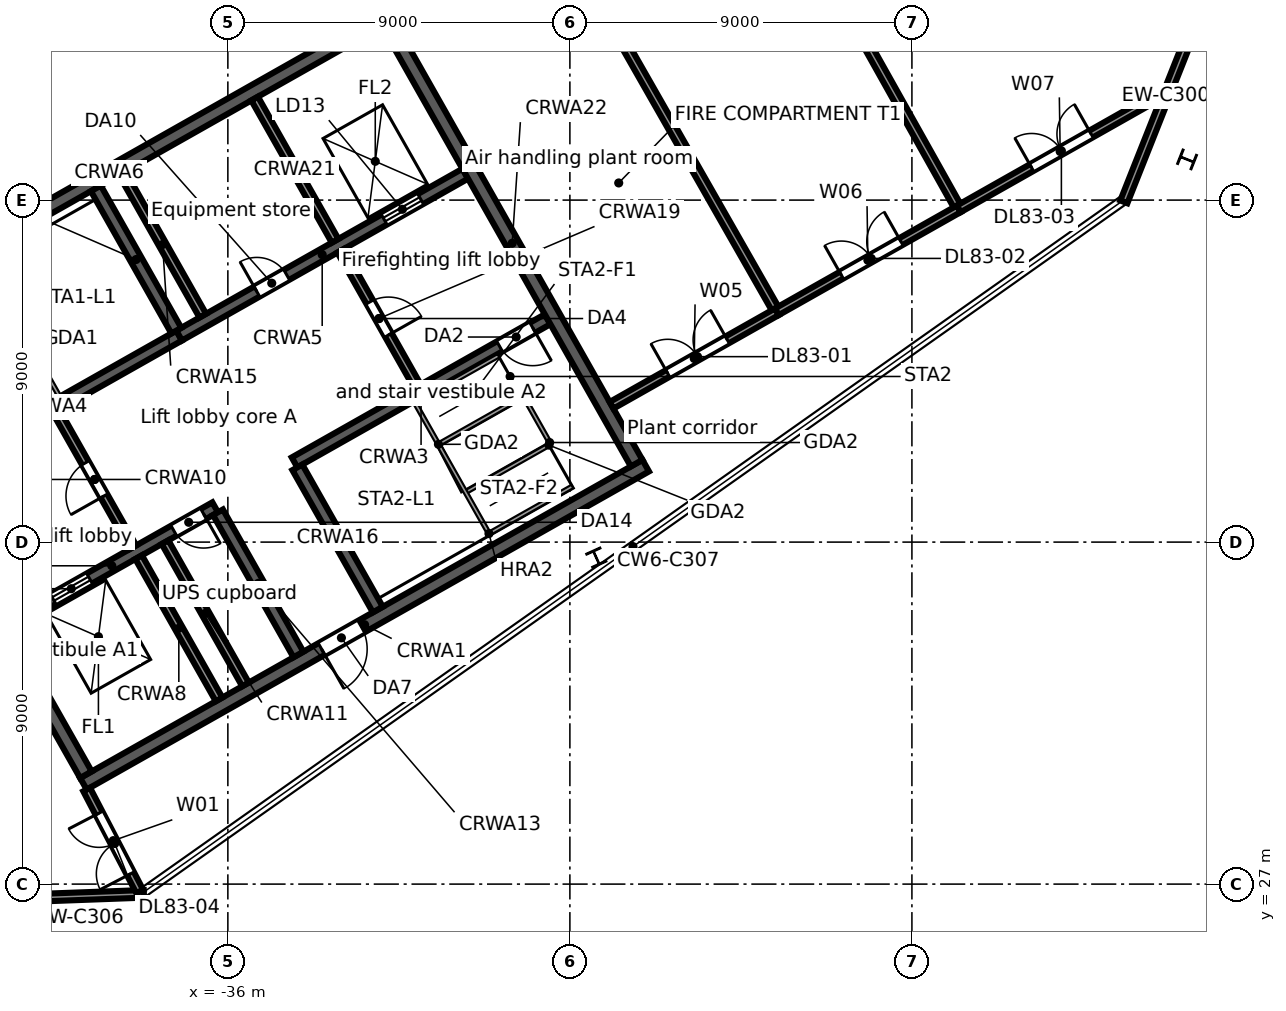
"""IFC4 building model, lengths in metres.
Left out: names, types, materials, properties, quantities, classifications, styles, units other than length and angle.
Written with IfcOpenShell. Run it as: python <this file> out.ifc"""

import sys

from ifc_helpers import new_model, si_unit, direction, frame, frame_2d, origin, origin_2d, place, context, subcontext, project, spatial, rectangle, i_section, extrude, element, fill, save


model = new_model("IFC4")
c1 = context("Model", 3, precision=1e-05, world=origin(), true_north=direction((0.0, 1.0)))
c2 = subcontext(c1, "Body", "Model", "MODEL_VIEW")
j1 = project(units=[si_unit("LENGTHUNIT", "METRE"), si_unit("PLANEANGLEUNIT", "RADIAN")], contexts=[c1])
p1 = place(None, origin())
s1 = spatial("IfcSite", under=j1, at=p1, CompositionType="ELEMENT")
p2 = place(p1, origin())
s2 = spatial("IfcBuilding", under=s1, at=p2, CompositionType="ELEMENT")
p3 = place(p2, frame((0.0, 0.0, 361.3)))
s3 = spatial("IfcBuildingStorey", under=s2, at=p3, CompositionType="ELEMENT", Elevation=361.3)
p4 = place(p3, frame((-10.76, 46.071, 0.0), z_axis=(0.0, 0.0, 1.0), x_axis=(0.369033125724, 0.929416242659, 0.0)))
e1 = element("IfcColumn", 1, at=p4, inside=s3, PredefinedType="COLUMN", context=c2, shape_type="SweptSolid", body=[
    extrude(i_section(OverallWidth=0.4, OverallDepth=0.4, WebThickness=0.013, FlangeThickness=0.021, FilletRadius=0.022, at=origin_2d()), origin(), (0.0, 0.0, 1.0), 3.6),
])
p5 = place(p3, frame((-26.305, 35.591, -0.3), z_axis=(0.0, 0.0, 1.0), x_axis=(0.910705289655, 0.413056745973, 0.0)))
e2 = element("IfcColumn", 2, at=p5, inside=s3, PredefinedType="COLUMN", context=c2, shape_type="SweptSolid", body=[
    extrude(i_section(OverallWidth=0.4, OverallDepth=0.4, WebThickness=0.013, FlangeThickness=0.021, FilletRadius=0.022, at=origin_2d()), origin(), (0.0, 0.0, 1.0), 3.9),
])
p6 = place(p3, frame((-10.22, 50.501, 0.0), z_axis=(0.0, 0.0, 1.0), x_axis=(-0.369026712049, -0.929418789241, 0.0)))
e3 = element("IfcWall", 3, at=p6, inside=s3, PredefinedType="STANDARD", context=c2, shape_type="SweptSolid", body=[
    extrude(rectangle(XDim=5.968, YDim=0.2, at=frame_2d((2.984, 0.0))), origin(), (0.0, 0.0, 1.0), 2.7),
])
p7 = place(p3, frame((-38.21, 26.744, 0.0), z_axis=(0.0, 0.0, 1.0), x_axis=(-0.999319030106, -0.036898185155, 0.0)))
e4 = element("IfcWall", 4, at=p7, inside=s3, PredefinedType="STANDARD", context=c2, shape_type="SweptSolid", body=[
    extrude(rectangle(XDim=5.968, YDim=0.2, at=frame_2d((2.984, 0.0))), origin(), (0.0, 0.0, 1.0), 3.3),
])
p8 = place(p3, frame((-39.801, 29.64, 0.0), z_axis=(0.0, 0.0, 1.0), x_axis=(0.870359753402, 0.492416388494, 0.0)))
e5 = element("IfcWall", 5, at=p8, inside=s3, PredefinedType="SOLIDWALL", context=c2, shape_type="SweptSolid", body=[
    extrude(rectangle(XDim=17.0, YDim=0.35, at=frame_2d((8.5, 0.0))), origin(), (0.0, 0.0, 1.0), 3.3),
])
p9 = place(p8, frame((7.2, 0.0, 0.0)))
e6 = element("IfcOpeningElement", 6, at=p9, cuts=e5, PredefinedType="OPENING", context=c2, shape_type="SweptSolid", body=[
    extrude(rectangle(XDim=1.2, YDim=2.1, at=frame_2d((0.6, 1.05))), frame((0.0, 0.185, 0.0), z_axis=(0.0, -1.0, 0.0), x_axis=(1.0, 0.0, 0.0)), (0.0, 0.0, 1.0), 0.37),
])
p10 = place(p3, frame((-41.774, 33.838, 0.0), z_axis=(0.0, 0.0, 1.0), x_axis=(0.870355415866, 0.492424055132, 0.0)))
e7 = element("IfcWall", 7, at=p10, inside=s3, PredefinedType="SOLIDWALL", context=c2, shape_type="SweptSolid", body=[
    extrude(rectangle(XDim=6.25, YDim=0.3, at=frame_2d((3.125, 0.0))), origin(), (0.0, 0.0, 1.0), 3.3),
])
p11 = place(p10, frame((1.35, 0.0, 0.0)))
e8 = element("IfcOpeningElement", 8, at=p11, cuts=e7, PredefinedType="OPENING", context=c2, shape_type="SweptSolid", body=[
    extrude(rectangle(XDim=1.1, YDim=2.1, at=frame_2d((0.55, 1.05))), frame((0.0, 0.16, 0.0), z_axis=(0.0, -1.0, 0.0), x_axis=(1.0, 0.0, 0.0)), (0.0, 0.0, 1.0), 0.32),
])
p12 = place(p10, frame((5.0, 0.0, 0.0)))
e9 = element("IfcOpeningElement", 9, at=p12, cuts=e7, PredefinedType="OPENING", context=c2, shape_type="SweptSolid", body=[
    extrude(rectangle(XDim=0.9, YDim=2.1, at=frame_2d((0.45, 1.05))), frame((0.0, 0.16, 0.0), z_axis=(0.0, -1.0, 0.0), x_axis=(1.0, 0.0, 0.0)), (0.0, 0.0, 1.0), 0.32),
])
p13 = place(p3, frame((-34.245, 38.097, 0.0), z_axis=(0.0, 0.0, 1.0), x_axis=(0.870352347706, 0.49242947804, 0.0)))
e10 = element("IfcWall", 10, at=p13, inside=s3, PredefinedType="SOLIDWALL", context=c2, shape_type="SweptSolid", body=[
    extrude(rectangle(XDim=7.65, YDim=0.3, at=frame_2d((3.825, 0.0))), origin(), (0.0, 0.0, 1.0), 3.3),
])
p14 = place(p13, frame((6.2, 0.0, 0.0)))
e11 = element("IfcOpeningElement", 11, at=p14, cuts=e10, PredefinedType="OPENING", context=c2, shape_type="SweptSolid", body=[
    extrude(rectangle(XDim=1.0, YDim=2.1, at=frame_2d((0.5, 1.05))), frame((0.0, 0.16, 0.0), z_axis=(0.0, -1.0, 0.0), x_axis=(1.0, 0.0, 0.0)), (0.0, 0.0, 1.0), 0.32),
])
p15 = place(p3, frame((-43.94, 37.667, 0.0), z_axis=(0.0, 0.0, 1.0), x_axis=(0.870352347706, 0.49242947804, 0.0)))
e12 = element("IfcWall", 12, at=p15, inside=s3, PredefinedType="SOLIDWALL", context=c2, shape_type="SweptSolid", body=[
    extrude(rectangle(XDim=7.65, YDim=0.3, at=frame_2d((3.825, 0.0))), origin(), (0.0, 0.0, 1.0), 3.3),
])
p16 = place(p15, frame((0.45, 0.0, 0.0)))
e13 = element("IfcOpeningElement", 13, at=p16, cuts=e12, PredefinedType="OPENING", context=c2, shape_type="SweptSolid", body=[
    extrude(rectangle(XDim=1.0, YDim=2.1, at=frame_2d((0.5, 1.05))), frame((0.0, 0.16, 0.0), z_axis=(0.0, -1.0, 0.0), x_axis=(1.0, 0.0, 0.0)), (0.0, 0.0, 1.0), 0.32),
])
p17 = place(p3, frame((-37.282, 41.435, 0.0), z_axis=(0.0, 0.0, 1.0), x_axis=(0.870364588774, 0.492407841741, 0.0)))
e14 = element("IfcWall", 14, at=p17, inside=s3, PredefinedType="SOLIDWALL", context=c2, shape_type="SweptSolid", body=[
    extrude(rectangle(XDim=8.65, YDim=0.3, at=frame_2d((4.325, 0.0))), origin(), (0.0, 0.0, 1.0), 3.3),
])
p18 = place(p17, frame((6.2, 0.0, 0.0)))
e15 = element("IfcOpeningElement", 15, at=p18, cuts=e14, PredefinedType="OPENING", context=c2, shape_type="SweptSolid", body=[
    extrude(rectangle(XDim=1.1, YDim=2.1, at=frame_2d((0.55, 1.05))), frame((0.0, 0.16, 0.0), z_axis=(0.0, -1.0, 0.0), x_axis=(1.0, 0.0, 0.0)), (0.0, 0.0, 1.0), 0.32),
])
p19 = place(p17, frame((2.35, 0.0, 0.0)))
e16 = element("IfcOpeningElement", 16, at=p19, cuts=e14, PredefinedType="OPENING", context=c2, shape_type="SweptSolid", body=[
    extrude(rectangle(XDim=0.9, YDim=2.1, at=frame_2d((0.45, 1.05))), frame((0.0, 0.16, 0.0), z_axis=(0.0, -1.0, 0.0), x_axis=(1.0, 0.0, 0.0)), (0.0, 0.0, 1.0), 0.32),
])
p20 = place(p3, frame((-46.522, 41.521, 0.0), z_axis=(0.0, 0.0, 1.0), x_axis=(0.870359753402, 0.492416388494, 0.0)))
e17 = element("IfcWall", 17, at=p20, inside=s3, PredefinedType="SOLIDWALL", context=c2, shape_type="SweptSolid", body=[
    extrude(rectangle(XDim=17.0, YDim=0.35, at=frame_2d((8.5, 0.0))), origin(), (0.0, 0.0, 1.0), 3.3),
])
p21 = place(p3, frame((-46.284, 41.454, 0.0), z_axis=(0.0, 0.0, 1.0), x_axis=(0.492429810477, -0.870352159619, 0.0)))
e18 = element("IfcWall", 18, at=p21, inside=s3, PredefinedType="SOLIDWALL", context=c2, shape_type="SweptSolid", body=[
    extrude(rectangle(XDim=13.3, YDim=0.35, at=frame_2d((6.65, 0.0))), origin(), (0.0, 0.0, 1.0), 3.3),
])
p22 = place(p3, frame((-38.349, 35.603, 0.0), z_axis=(0.0, 0.0, 1.0), x_axis=(0.492410799949, -0.870362915164, 0.0)))
e19 = element("IfcWall", 19, at=p22, inside=s3, PredefinedType="SOLIDWALL", context=c2, shape_type="SweptSolid", body=[
    extrude(rectangle(XDim=4.3, YDim=0.2, at=frame_2d((2.15, 0.0))), origin(), (0.0, 0.0, 1.0), 3.3),
])
p23 = place(p3, frame((-40.516, 39.433, 0.0), z_axis=(0.0, 0.0, 1.0), x_axis=(0.492453559952, -0.87033872216, 0.0)))
e20 = element("IfcWall", 20, at=p23, inside=s3, PredefinedType="PARTITIONING", context=c2, shape_type="SweptSolid", body=[
    extrude(rectangle(XDim=4.1, YDim=0.2, at=frame_2d((2.05, 0.0))), origin(), (0.0, 0.0, 1.0), 3.3),
])
p24 = place(p23, frame((1.55, 0.0, 0.0)))
e21 = element("IfcOpeningElement", 21, at=p24, cuts=e20, PredefinedType="OPENING", context=c2, shape_type="SweptSolid", body=[
    extrude(rectangle(XDim=1.0, YDim=2.1, at=frame_2d((0.5, 1.05))), frame((0.0, 0.11, 0.0), z_axis=(0.0, -1.0, 0.0), x_axis=(1.0, 0.0, 0.0)), (0.0, 0.0, 1.0), 0.22),
])
p25 = place(p3, frame((-37.653, 35.997, 0.0), z_axis=(0.0, 0.0, 1.0), x_axis=(0.492435133428, -0.870349147967, 0.0)))
e22 = element("IfcWall", 22, at=p25, inside=s3, PredefinedType="SOLIDWALL", context=c2, shape_type="SweptSolid", body=[
    extrude(rectangle(XDim=4.3, YDim=0.2, at=frame_2d((2.15, 0.0))), origin(), (0.0, 0.0, 1.0), 3.3),
])
p26 = place(p3, frame((-36.26, 36.785, 0.0), z_axis=(0.0, 0.0, 1.0), x_axis=(0.492435133428, -0.870349147967, 0.0)))
e23 = element("IfcWall", 23, at=p26, inside=s3, PredefinedType="SOLIDWALL", context=c2, shape_type="SweptSolid", body=[
    extrude(rectangle(XDim=4.3, YDim=0.3, at=frame_2d((2.15, 0.0))), origin(), (0.0, 0.0, 1.0), 3.3),
])
p27 = place(p3, frame((-39.473, 45.308, 0.0), z_axis=(0.0, 0.0, 1.0), x_axis=(0.492410799949, -0.870362915164, 0.0)))
e24 = element("IfcWall", 24, at=p27, inside=s3, PredefinedType="SOLIDWALL", context=c2, shape_type="SweptSolid", body=[
    extrude(rectangle(XDim=4.3, YDim=0.3, at=frame_2d((2.15, 0.0))), origin(), (0.0, 0.0, 1.0), 3.3),
])
p28 = place(p3, frame((-38.777, 45.701, 0.0), z_axis=(0.0, 0.0, 1.0), x_axis=(0.492435133428, -0.870349147967, 0.0)))
e25 = element("IfcWall", 25, at=p28, inside=s3, PredefinedType="SOLIDWALL", context=c2, shape_type="SweptSolid", body=[
    extrude(rectangle(XDim=4.3, YDim=0.2, at=frame_2d((2.15, 0.0))), origin(), (0.0, 0.0, 1.0), 3.3),
])
p29 = place(p3, frame((-34.171, 37.967, 0.0), z_axis=(0.0, 0.0, 1.0), x_axis=(0.492435133428, -0.870349147967, 0.0)))
e26 = element("IfcWall", 26, at=p29, inside=s3, PredefinedType="SOLIDWALL", context=c2, shape_type="SweptSolid", body=[
    extrude(rectangle(XDim=4.3, YDim=0.3, at=frame_2d((2.15, 0.0))), origin(), (0.0, 0.0, 1.0), 3.3),
])
p30 = place(p3, frame((-33.031, 43.667, 0.0), z_axis=(0.0, 0.0, 1.0), x_axis=(0.492408451753, -0.87036424366, 0.0)))
e27 = element("IfcWall", 27, at=p30, inside=s3, PredefinedType="PARTITIONING", context=c2, shape_type="SweptSolid", body=[
    extrude(rectangle(XDim=4.1, YDim=0.2, at=frame_2d((2.05, 0.0))), origin(), (0.0, 0.0, 1.0), 3.3),
])
p31 = place(p30, frame((1.55, 0.0, 0.0)))
e28 = element("IfcOpeningElement", 28, at=p31, cuts=e27, PredefinedType="OPENING", context=c2, shape_type="SweptSolid", body=[
    extrude(rectangle(XDim=1.0, YDim=2.1, at=frame_2d((0.5, 1.05))), frame((0.0, 0.11, 0.0), z_axis=(0.0, -1.0, 0.0), x_axis=(1.0, 0.0, 0.0)), (0.0, 0.0, 1.0), 0.22),
])
p32 = place(p3, frame((-35.296, 47.671, 0.0), z_axis=(0.0, 0.0, 1.0), x_axis=(0.492435133428, -0.870349147967, 0.0)))
e29 = element("IfcWall", 29, at=p32, inside=s3, PredefinedType="SOLIDWALL", context=c2, shape_type="SweptSolid", body=[
    extrude(rectangle(XDim=4.3, YDim=0.2, at=frame_2d((2.15, 0.0))), origin(), (0.0, 0.0, 1.0), 3.3),
])
p33 = place(p3, frame((-31.792, 49.653, 0.0), z_axis=(0.0, 0.0, 1.0), x_axis=(0.492421943245, -0.870356610712, 0.0)))
e30 = element("IfcWall", 30, at=p33, inside=s3, PredefinedType="SOLIDWALL", context=c2, shape_type="SweptSolid", body=[
    extrude(rectangle(XDim=13.3, YDim=0.35, at=frame_2d((6.65, 0.0))), origin(), (0.0, 0.0, 1.0), 3.3),
])
p34 = place(p3, frame((-39.715, 29.488, 0.0), z_axis=(0.0, 0.0, 1.0), x_axis=(0.461720517785, -0.887025458178, 0.0)))
e31 = element("IfcWall", 31, at=p34, inside=s3, PredefinedType="PARTITIONING", context=c2, shape_type="SweptSolid", body=[
    extrude(rectangle(XDim=3.03, YDim=0.2, at=frame_2d((1.515, 0.0))), origin(), (0.0, 0.0, 1.0), 3.3),
])
p35 = place(p34, frame((0.7, 0.0, 0.0)))
e32 = element("IfcOpeningElement", 32, at=p35, cuts=e31, PredefinedType="OPENING", context=c2, shape_type="SweptSolid", body=[
    extrude(rectangle(XDim=1.8, YDim=2.1, at=frame_2d((0.9, 1.05))), frame((0.0, 0.11, 0.0), z_axis=(0.0, -1.0, 0.0), x_axis=(1.0, 0.0, 0.0)), (0.0, 0.0, 1.0), 0.22),
])
p36 = place(p3, frame((-31.031, 58.679, 0.0), z_axis=(0.0, 0.0, 1.0), x_axis=(0.495492853456, -0.868612014753, 0.0)))
e33 = element("IfcWall", 33, at=p36, inside=s3, PredefinedType="PARTITIONING", context=c2, shape_type="SweptSolid", body=[
    extrude(rectangle(XDim=19.13, YDim=0.2, at=frame_2d((9.565, 0.0))), origin(), (0.0, 0.0, 1.0), 2.68),
])
p37 = place(p3, frame((-26.399, 61.95, 0.0), z_axis=(0.0, 0.0, 1.0), x_axis=(0.489116217078, -0.872218622933, 0.0)))
e34 = element("IfcWall", 34, at=p37, inside=s3, PredefinedType="PARTITIONING", context=c2, shape_type="SweptSolid", body=[
    extrude(rectangle(XDim=19.697, YDim=0.2, at=frame_2d((9.848, 0.0))), origin(), (0.0, 0.0, 1.0), 2.68),
])
p38 = place(p3, frame((-25.904, 39.6, 0.0), z_axis=(0.0, 0.0, 1.0), x_axis=(0.870386362759, 0.492369352746, 0.0)))
e35 = element("IfcWall", 35, at=p38, inside=s3, PredefinedType="PARTITIONING", context=c2, shape_type="SweptSolid", body=[
    extrude(rectangle(XDim=5.0, YDim=0.2, at=frame_2d((2.5, 0.0))), origin(), (0.0, 0.0, 1.0), 3.3),
])
p39 = place(p38, frame((1.7, 0.0, 0.0)))
e36 = element("IfcOpeningElement", 36, at=p39, cuts=e35, PredefinedType="OPENING", context=c2, shape_type="SweptSolid", body=[
    extrude(rectangle(XDim=1.8, YDim=2.1, at=frame_2d((0.9, 1.05))), frame((0.0, 0.11, 0.0), z_axis=(0.0, -1.0, 0.0), x_axis=(1.0, 0.0, 0.0)), (0.0, 0.0, 1.0), 0.22),
])
p40 = place(p3, frame((-21.552, 42.062, 0.0), z_axis=(0.0, 0.0, 1.0), x_axis=(0.870387515286, 0.492367315359, 0.0)))
e37 = element("IfcWall", 37, at=p40, inside=s3, PredefinedType="PARTITIONING", context=c2, shape_type="SweptSolid", body=[
    extrude(rectangle(XDim=5.5, YDim=0.2, at=frame_2d((2.75, 0.0))), origin(), (0.0, 0.0, 1.0), 3.3),
])
p41 = place(p40, frame((1.95, 0.0, 0.0)))
e38 = element("IfcOpeningElement", 38, at=p41, cuts=e37, PredefinedType="OPENING", context=c2, shape_type="SweptSolid", body=[
    extrude(rectangle(XDim=1.8, YDim=2.1, at=frame_2d((0.9, 1.05))), frame((0.0, 0.11, 0.0), z_axis=(0.0, -1.0, 0.0), x_axis=(1.0, 0.0, 0.0)), (0.0, 0.0, 1.0), 0.22),
])
p42 = place(p3, frame((-16.765, 44.77, 0.0), z_axis=(0.0, 0.0, 1.0), x_axis=(0.870320026037, 0.492486601116, 0.0)))
e39 = element("IfcWall", 39, at=p42, inside=s3, PredefinedType="PARTITIONING", context=c2, shape_type="SweptSolid", body=[
    extrude(rectangle(XDim=6.126, YDim=0.2, at=frame_2d((3.063, 0.0))), origin(), (0.0, 0.0, 1.0), 3.3),
])
p43 = place(p42, frame((2.2, 0.0, 0.0)))
e40 = element("IfcOpeningElement", 40, at=p43, cuts=e39, PredefinedType="OPENING", context=c2, shape_type="SweptSolid", body=[
    extrude(rectangle(XDim=1.8, YDim=2.1, at=frame_2d((0.9, 1.05))), frame((0.0, 0.11, 0.0), z_axis=(0.0, -1.0, 0.0), x_axis=(1.0, 0.0, 0.0)), (0.0, 0.0, 1.0), 0.22),
])
p44 = place(p18, origin())
e41 = element("IfcDoor", 41, at=p44, inside=s3, OperationType="DOUBLE_DOOR_SLIDING", PredefinedType="DOOR", context=c2, shape_type="SweptSolid", body=[
    extrude(rectangle(XDim=1.1, YDim=2.1, at=frame_2d((0.55, 1.05))), frame((0.0, 0.025, 0.0), z_axis=(0.0, -1.0, 0.0), x_axis=(1.0, 0.0, 0.0)), (0.0, 0.0, 1.0), 0.05),
])
fill(e15, e41)
p45 = place(p11, origin())
e42 = element("IfcDoor", 42, at=p45, inside=s3, OperationType="DOUBLE_DOOR_SLIDING", PredefinedType="DOOR", context=c2, shape_type="SweptSolid", body=[
    extrude(rectangle(XDim=1.1, YDim=2.1, at=frame_2d((0.55, 1.05))), frame((0.0, 0.025, 0.0), z_axis=(0.0, -1.0, 0.0), x_axis=(1.0, 0.0, 0.0)), (0.0, 0.0, 1.0), 0.05),
])
fill(e8, e42)
p46 = place(p14, frame((1.0, 0.0, 0.0), z_axis=(0.0, 0.0, 1.0), x_axis=(-1.0, 0.0, 0.0)))
e43 = element("IfcDoor", 43, at=p46, inside=s3, OperationType="SINGLE_SWING_LEFT", PredefinedType="DOOR", context=c2, shape_type="SweptSolid", body=[
    extrude(rectangle(XDim=1.0, YDim=2.1, at=frame_2d((0.5, 1.05))), frame((0.0, 0.025, 0.0), z_axis=(0.0, -1.0, 0.0), x_axis=(1.0, 0.0, 0.0)), (0.0, 0.0, 1.0), 0.05),
])
fill(e11, e43)
p47 = place(p24, frame((1.0, 0.0, 0.0), z_axis=(0.0, 0.0, 1.0), x_axis=(-1.0, 0.0, 0.0)))
e44 = element("IfcDoor", 44, at=p47, inside=s3, OperationType="SINGLE_SWING_LEFT", PredefinedType="DOOR", context=c2, shape_type="SweptSolid", body=[
    extrude(rectangle(XDim=1.0, YDim=2.1, at=frame_2d((0.5, 1.05))), frame((0.0, 0.025, 0.0), z_axis=(0.0, -1.0, 0.0), x_axis=(1.0, 0.0, 0.0)), (0.0, 0.0, 1.0), 0.05),
])
fill(e21, e44)
p48 = place(p31, origin())
e45 = element("IfcDoor", 45, at=p48, inside=s3, OperationType="SINGLE_SWING_RIGHT", PredefinedType="DOOR", context=c2, shape_type="SweptSolid", body=[
    extrude(rectangle(XDim=1.0, YDim=2.1, at=frame_2d((0.5, 1.05))), frame((0.0, 0.025, 0.0), z_axis=(0.0, -1.0, 0.0), x_axis=(1.0, 0.0, 0.0)), (0.0, 0.0, 1.0), 0.05),
])
fill(e28, e45)
p49 = place(p9, frame((1.2, 0.0, 0.0), z_axis=(0.0, 0.0, 1.0), x_axis=(-1.0, 0.0, 0.0)))
e46 = element("IfcDoor", 46, at=p49, inside=s3, OperationType="SINGLE_SWING_RIGHT", PredefinedType="DOOR", context=c2, shape_type="SweptSolid", body=[
    extrude(rectangle(XDim=1.2, YDim=2.1, at=frame_2d((0.6, 1.05))), frame((0.0, 0.025, 0.0), z_axis=(0.0, -1.0, 0.0), x_axis=(1.0, 0.0, 0.0)), (0.0, 0.0, 1.0), 0.05),
])
fill(e6, e46)
p50 = place(p19, origin())
e47 = element("IfcDoor", 47, at=p50, inside=s3, OperationType="SINGLE_SWING_LEFT", PredefinedType="DOOR", context=c2, shape_type="SweptSolid", body=[
    extrude(rectangle(XDim=0.9, YDim=2.1, at=frame_2d((0.45, 1.05))), frame((0.0, 0.025, 0.0), z_axis=(0.0, -1.0, 0.0), x_axis=(1.0, 0.0, 0.0)), (0.0, 0.0, 1.0), 0.05),
])
fill(e16, e47)
p51 = place(p12, frame((0.9, 0.0, 0.0), z_axis=(0.0, 0.0, 1.0), x_axis=(-1.0, 0.0, 0.0)))
e48 = element("IfcDoor", 48, at=p51, inside=s3, OperationType="SINGLE_SWING_LEFT", PredefinedType="DOOR", context=c2, shape_type="SweptSolid", body=[
    extrude(rectangle(XDim=0.9, YDim=2.1, at=frame_2d((0.45, 1.05))), frame((0.0, 0.025, 0.0), z_axis=(0.0, -1.0, 0.0), x_axis=(1.0, 0.0, 0.0)), (0.0, 0.0, 1.0), 0.05),
])
fill(e9, e48)
p52 = place(p39, origin())
e49 = element("IfcDoor", 49, at=p52, inside=s3, OperationType="DOUBLE_DOOR_SINGLE_SWING", PredefinedType="DOOR", context=c2, shape_type="SweptSolid", body=[
    extrude(rectangle(XDim=1.8, YDim=2.1, at=frame_2d((0.9, 1.05))), frame((0.0, 0.025, 0.0), z_axis=(0.0, -1.0, 0.0), x_axis=(1.0, 0.0, 0.0)), (0.0, 0.0, 1.0), 0.05),
])
fill(e36, e49)
p53 = place(p41, origin())
e50 = element("IfcDoor", 50, at=p53, inside=s3, OperationType="DOUBLE_DOOR_SINGLE_SWING", PredefinedType="DOOR", context=c2, shape_type="SweptSolid", body=[
    extrude(rectangle(XDim=1.8, YDim=2.1, at=frame_2d((0.9, 1.05))), frame((0.0, 0.025, 0.0), z_axis=(0.0, -1.0, 0.0), x_axis=(1.0, 0.0, 0.0)), (0.0, 0.0, 1.0), 0.05),
])
fill(e38, e50)
p54 = place(p43, origin())
e51 = element("IfcDoor", 51, at=p54, inside=s3, OperationType="DOUBLE_DOOR_SINGLE_SWING", PredefinedType="DOOR", context=c2, shape_type="SweptSolid", body=[
    extrude(rectangle(XDim=1.8, YDim=2.1, at=frame_2d((0.9, 1.05))), frame((0.0, 0.025, 0.0), z_axis=(0.0, -1.0, 0.0), x_axis=(1.0, 0.0, 0.0)), (0.0, 0.0, 1.0), 0.05),
])
fill(e40, e51)
p55 = place(p35, frame((1.8, 0.0, 0.0), z_axis=(0.0, 0.0, 1.0), x_axis=(-1.0, 0.0, 0.0)))
e52 = element("IfcDoor", 52, at=p55, inside=s3, OperationType="DOUBLE_DOOR_SINGLE_SWING", PredefinedType="DOOR", context=c2, shape_type="SweptSolid", body=[
    extrude(rectangle(XDim=1.8, YDim=2.1, at=frame_2d((0.9, 1.05))), frame((0.0, 0.025, 0.0), z_axis=(0.0, -1.0, 0.0), x_axis=(1.0, 0.0, 0.0)), (0.0, 0.0, 1.0), 0.05),
])
fill(e32, e52)
save(model, sys.argv[1])
